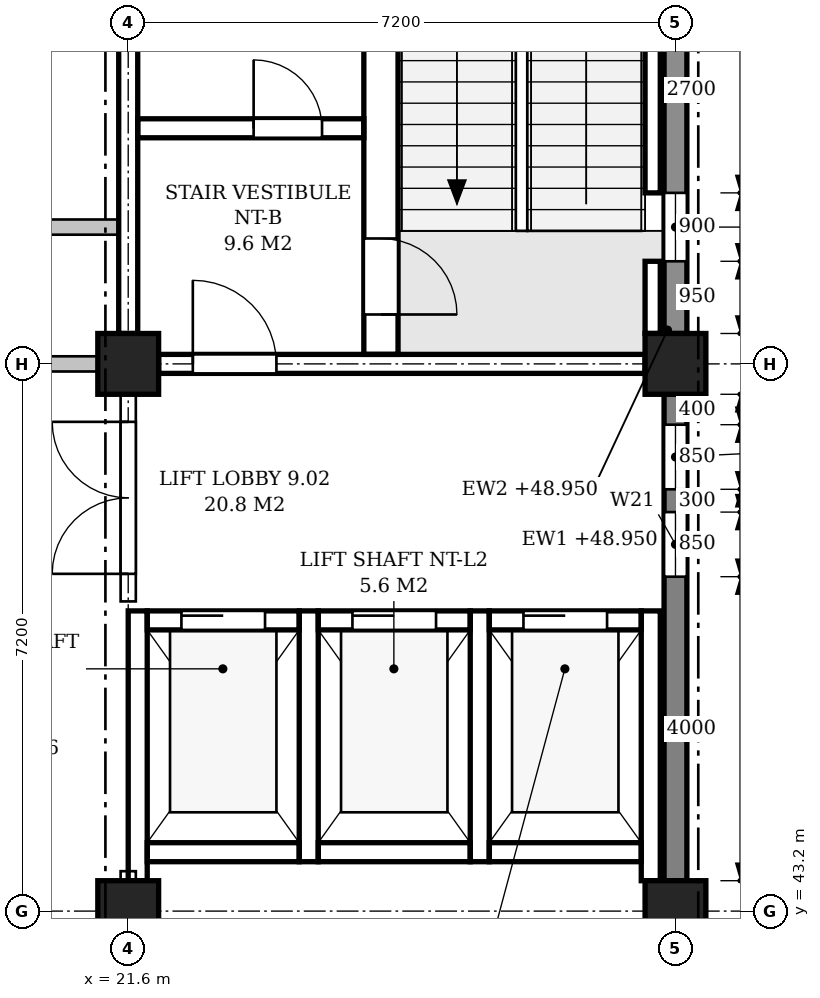
"""IFC4 building model, lengths in metres.
Left out: names, types, materials, properties, quantities, classifications, styles, units other than length and angle.
Written with IfcOpenShell. Run it as: python <this file> out.ifc"""

import sys

from ifc_helpers import new_model, si_unit, direction, frame, frame_2d, origin, origin_2d, place, context, subcontext, project, spatial, polyline, rectangle, outline, extrude, element, fill, save


model = new_model("IFC4")
c1 = context("Model", 3, precision=1e-05, world=origin(), true_north=direction((0.0, 1.0)))
c2 = subcontext(c1, "Body", "Model", "MODEL_VIEW")
j1 = project(units=[si_unit("LENGTHUNIT", "METRE"), si_unit("PLANEANGLEUNIT", "RADIAN")], contexts=[c1])
p1 = place(None, origin())
s1 = spatial("IfcSite", under=j1, at=p1, CompositionType="ELEMENT")
p2 = place(p1, origin())
s2 = spatial("IfcBuilding", under=s1, at=p2, CompositionType="ELEMENT")
p3 = place(p2, frame((0.0, 0.0, 45.3)))
s3 = spatial("IfcBuildingStorey", under=s2, at=p3, CompositionType="ELEMENT", Elevation=45.3)
for number, where, z_axis, x_axis in (
    (1, (21.6, 43.2, 0.0), (0.0, 0.0, 1.0), (1.0, 0.0, 0.0)),
    (2, (21.6, 50.4, 0.0), (0.0, 0.0, 1.0), (1.0, 0.0, 0.0)),
    (3, (28.8, 43.2, 0.0), (0.0, 0.0, 1.0), (1.0, 0.0, 0.0)),
    (4, (28.8, 50.4, 0.0), (0.0, 0.0, 1.0), (1.0, 0.0, 0.0)),
):
    element("IfcColumn", number, at=place(p3, frame(where, z_axis=z_axis, x_axis=x_axis)), inside=s3, PredefinedType="COLUMN", context=c2, shape_type="SweptSolid", body=[
        extrude(rectangle(XDim=0.8, YDim=0.8, at=origin_2d()), origin(), (0.0, 0.0, 1.0), 4.5),
    ])
p4 = place(p3, frame((28.8, 43.6, 0.0), z_axis=(0.0, 0.0, 1.0), x_axis=(0.0, 1.0, 0.0)))
e5 = element("IfcWall", 5, at=p4, inside=s3, PredefinedType="STANDARD", context=c2, shape_type="SweptSolid", body=[
    extrude(rectangle(XDim=6.4, YDim=0.3, at=frame_2d((3.2, 0.0))), origin(), (0.0, 0.0, 1.0), 3.65),
])
p5 = place(p4, frame((4.0, 0.0, 0.9)))
e6 = element("IfcOpeningElement", 6, at=p5, cuts=e5, PredefinedType="OPENING", context=c2, shape_type="SweptSolid", body=[
    extrude(outline(polyline([(0.0, 0.0), (0.85, 0.0), (0.85, 2.25), (0.425, 2.7), (0.0, 2.25), (0.0, 0.0)])), frame((0.0, 0.16, 0.0), z_axis=(0.0, -1.0, 0.0), x_axis=(1.0, 0.0, 0.0)), (0.0, 0.0, 1.0), 0.32),
])
p6 = place(p4, frame((5.15, 0.0, 0.9)))
e7 = element("IfcOpeningElement", 7, at=p6, cuts=e5, PredefinedType="OPENING", context=c2, shape_type="SweptSolid", body=[
    extrude(outline(polyline([(0.0, 0.0), (0.85, 0.0), (0.85, 2.25), (0.425, 2.7), (0.0, 2.25), (0.0, 0.0)])), frame((0.0, 0.16, 0.0), z_axis=(0.0, -1.0, 0.0), x_axis=(1.0, 0.0, 0.0)), (0.0, 0.0, 1.0), 0.32),
])
p7 = place(p3, frame((28.8, 50.8, 0.0), z_axis=(0.0, 0.0, 1.0), x_axis=(0.0, 1.0, 0.0)))
e8 = element("IfcWall", 8, at=p7, inside=s3, PredefinedType="STANDARD", context=c2, shape_type="SweptSolid", body=[
    extrude(rectangle(XDim=6.4, YDim=0.3, at=frame_2d((3.2, 0.0))), origin(), (0.0, 0.0, 1.0), 3.65),
])
p8 = place(p7, frame((0.95, 0.0, 0.9)))
e9 = element("IfcOpeningElement", 9, at=p8, cuts=e8, PredefinedType="OPENING", context=c2, shape_type="SweptSolid", body=[
    extrude(outline(polyline([(0.0, 0.0), (0.9, 0.0), (0.9, 2.25), (0.45, 2.7), (0.0, 2.25), (0.0, 0.0)])), frame((0.0, 0.16, 0.0), z_axis=(0.0, -1.0, 0.0), x_axis=(1.0, 0.0, 0.0)), (0.0, 0.0, 1.0), 0.32),
])
p9 = place(p7, frame((4.55, 0.0, 0.9)))
e10 = element("IfcOpeningElement", 10, at=p9, cuts=e8, PredefinedType="OPENING", context=c2, shape_type="SweptSolid", body=[
    extrude(outline(polyline([(0.0, 0.0), (0.9, 0.0), (0.9, 2.25), (0.45, 2.7), (0.0, 2.25), (0.0, 0.0)])), frame((0.0, 0.16, 0.0), z_axis=(0.0, -1.0, 0.0), x_axis=(1.0, 0.0, 0.0)), (0.0, 0.0, 1.0), 0.32),
])
p10 = place(p3, frame((22.0, 50.4, 0.0), z_axis=(0.0, 0.0, 1.0), x_axis=(1.0, 0.0, 0.0)))
e11 = element("IfcWall", 11, at=p10, inside=s3, PredefinedType="SHEAR", context=c2, shape_type="SweptSolid", body=[
    extrude(rectangle(XDim=6.4, YDim=0.25, at=frame_2d((3.2, 0.0))), origin(), (0.0, 0.0, 1.0), 3.55),
])
p11 = place(p10, frame((0.45, 0.0, 0.0)))
e12 = element("IfcOpeningElement", 12, at=p11, cuts=e11, PredefinedType="OPENING", context=c2, shape_type="SweptSolid", body=[
    extrude(rectangle(XDim=1.1, YDim=2.1, at=frame_2d((0.55, 1.05))), frame((0.0, 0.135, 0.0), z_axis=(0.0, -1.0, 0.0), x_axis=(1.0, 0.0, 0.0)), (0.0, 0.0, 1.0), 0.27),
])
p12 = place(p3, frame((21.6, 50.8, 0.0), z_axis=(0.0, 0.0, 1.0), x_axis=(0.0, 1.0, 0.0)))
e13 = element("IfcWall", 13, at=p12, inside=s3, PredefinedType="SHEAR", context=c2, shape_type="SweptSolid", body=[
    extrude(rectangle(XDim=6.4, YDim=0.25, at=frame_2d((3.2, 0.0))), origin(), (0.0, 0.0, 1.0), 3.55),
])
p13 = place(p3, frame((28.5, 50.8, -0.25), z_axis=(0.0, 0.0, 1.0), x_axis=(0.0, 1.0, 0.0)))
e14 = element("IfcWall", 14, at=p13, inside=s3, PredefinedType="SHEAR", context=c2, shape_type="SweptSolid", body=[
    extrude(rectangle(XDim=0.95, YDim=0.2, at=frame_2d((0.475, 0.0))), origin(), (0.0, 0.0, 1.0), 4.5),
])
p14 = place(p3, frame((28.5, 52.65, -0.25), z_axis=(0.0, 0.0, 1.0), x_axis=(0.0, 1.0, 0.0)))
e15 = element("IfcWall", 15, at=p14, inside=s3, PredefinedType="SHEAR", context=c2, shape_type="SweptSolid", body=[
    extrude(rectangle(XDim=2.7, YDim=0.2, at=frame_2d((1.35, 0.0))), origin(), (0.0, 0.0, 1.0), 4.5),
])
p15 = place(p3, frame((24.925, 50.525, 0.0), z_axis=(0.0, 0.0, 1.0), x_axis=(0.0, 1.0, 0.0)))
e16 = element("IfcWall", 16, at=p15, inside=s3, PredefinedType="SHEAR", context=c2, shape_type="SweptSolid", body=[
    extrude(rectangle(XDim=6.925, YDim=0.45, at=frame_2d((3.462, 0.0))), origin(), (0.0, 0.0, 1.0), 4.25),
])
p16 = place(p15, frame((0.525, 0.0, 0.0)))
e17 = element("IfcOpeningElement", 17, at=p16, cuts=e16, PredefinedType="OPENING", context=c2, shape_type="SweptSolid", body=[
    extrude(rectangle(XDim=1.0, YDim=2.1, at=frame_2d((0.5, 1.05))), frame((0.0, 0.235, 0.0), z_axis=(0.0, -1.0, 0.0), x_axis=(1.0, 0.0, 0.0)), (0.0, 0.0, 1.0), 0.47),
])
p17 = place(p3, frame((21.725, 53.5, 0.0), z_axis=(0.0, 0.0, 1.0), x_axis=(1.0, 0.0, 0.0)))
e18 = element("IfcWall", 18, at=p17, inside=s3, PredefinedType="SHEAR", context=c2, shape_type="SweptSolid", body=[
    extrude(rectangle(XDim=2.975, YDim=0.25, at=frame_2d((1.487, 0.0))), origin(), (0.0, 0.0, 1.0), 4.25),
])
p18 = place(p17, frame((1.525, 0.0, 0.0)))
e19 = element("IfcOpeningElement", 19, at=p18, cuts=e18, PredefinedType="OPENING", context=c2, shape_type="SweptSolid", body=[
    extrude(rectangle(XDim=0.9, YDim=2.1, at=frame_2d((0.45, 1.05))), frame((0.0, 0.135, 0.0), z_axis=(0.0, -1.0, 0.0), x_axis=(1.0, 0.0, 0.0)), (0.0, 0.0, 1.0), 0.27),
])
p19 = place(p3, frame((21.725, 43.6, -0.25), z_axis=(0.0, 0.0, 1.0), x_axis=(0.0, 1.0, 0.0)))
e20 = element("IfcWall", 20, at=p19, inside=s3, PredefinedType="SHEAR", context=c2, shape_type="SweptSolid", body=[
    extrude(rectangle(XDim=3.55, YDim=0.25, at=frame_2d((1.775, 0.0))), origin(), (0.0, 0.0, 1.0), 3.8),
])
for number, where, z_axis, x_axis in (
    (21, (23.975, 43.85, -0.25), (0.0, 0.0, 1.0), (0.0, 1.0, 0.0)),
    (22, (26.225, 43.85, -0.25), (0.0, 0.0, 1.0), (0.0, 1.0, 0.0)),
):
    element("IfcWall", number, at=place(p3, frame(where, z_axis=z_axis, x_axis=x_axis)), inside=s3, PredefinedType="SHEAR", context=c2, shape_type="SweptSolid", body=[
        extrude(rectangle(XDim=3.3, YDim=0.25, at=frame_2d((1.65, 0.0))), origin(), (0.0, 0.0, 1.0), 4.5),
    ])
p20 = place(p3, frame((28.475, 43.6, -0.25), z_axis=(0.0, 0.0, 1.0), x_axis=(0.0, 1.0, 0.0)))
e23 = element("IfcWall", 23, at=p20, inside=s3, PredefinedType="SHEAR", context=c2, shape_type="SweptSolid", body=[
    extrude(rectangle(XDim=3.55, YDim=0.25, at=frame_2d((1.775, 0.0))), origin(), (0.0, 0.0, 1.0), 4.5),
])
p21 = place(p3, frame((21.85, 47.025, -0.25), z_axis=(0.0, 0.0, 1.0), x_axis=(1.0, 0.0, 0.0)))
e24 = element("IfcWall", 24, at=p21, inside=s3, PredefinedType="SHEAR", context=c2, shape_type="SweptSolid", body=[
    extrude(rectangle(XDim=2.0, YDim=0.25, at=frame_2d((1.0, 0.0))), origin(), (0.0, 0.0, 1.0), 4.5),
])
p22 = place(p21, frame((0.45, 0.0, 0.25)))
e25 = element("IfcOpeningElement", 25, at=p22, cuts=e24, PredefinedType="OPENING", context=c2, shape_type="SweptSolid", body=[
    extrude(rectangle(XDim=1.1, YDim=2.1, at=frame_2d((0.55, 1.05))), frame((0.0, 0.135, 0.0), z_axis=(0.0, -1.0, 0.0), x_axis=(1.0, 0.0, 0.0)), (0.0, 0.0, 1.0), 0.27),
])
p23 = place(p3, frame((21.85, 43.975, -0.25), z_axis=(0.0, 0.0, 1.0), x_axis=(1.0, 0.0, 0.0)))
e26 = element("IfcWall", 26, at=p23, inside=s3, PredefinedType="SHEAR", context=c2, shape_type="SweptSolid", body=[
    extrude(rectangle(XDim=2.0, YDim=0.25, at=frame_2d((1.0, 0.0))), origin(), (0.0, 0.0, 1.0), 4.5),
])
p24 = place(p3, frame((24.1, 47.025, -0.25), z_axis=(0.0, 0.0, 1.0), x_axis=(1.0, 0.0, 0.0)))
e27 = element("IfcWall", 27, at=p24, inside=s3, PredefinedType="SHEAR", context=c2, shape_type="SweptSolid", body=[
    extrude(rectangle(XDim=2.0, YDim=0.25, at=frame_2d((1.0, 0.0))), origin(), (0.0, 0.0, 1.0), 4.5),
])
p25 = place(p24, frame((0.45, 0.0, 0.25)))
e28 = element("IfcOpeningElement", 28, at=p25, cuts=e27, PredefinedType="OPENING", context=c2, shape_type="SweptSolid", body=[
    extrude(rectangle(XDim=1.1, YDim=2.1, at=frame_2d((0.55, 1.05))), frame((0.0, 0.135, 0.0), z_axis=(0.0, -1.0, 0.0), x_axis=(1.0, 0.0, 0.0)), (0.0, 0.0, 1.0), 0.27),
])
p26 = place(p3, frame((24.1, 43.975, -0.25), z_axis=(0.0, 0.0, 1.0), x_axis=(1.0, 0.0, 0.0)))
e29 = element("IfcWall", 29, at=p26, inside=s3, PredefinedType="SHEAR", context=c2, shape_type="SweptSolid", body=[
    extrude(rectangle(XDim=2.0, YDim=0.25, at=frame_2d((1.0, 0.0))), origin(), (0.0, 0.0, 1.0), 4.5),
])
p27 = place(p3, frame((26.35, 47.025, -0.25), z_axis=(0.0, 0.0, 1.0), x_axis=(1.0, 0.0, 0.0)))
e30 = element("IfcWall", 30, at=p27, inside=s3, PredefinedType="SHEAR", context=c2, shape_type="SweptSolid", body=[
    extrude(rectangle(XDim=2.0, YDim=0.25, at=frame_2d((1.0, 0.0))), origin(), (0.0, 0.0, 1.0), 4.5),
])
p28 = place(p27, frame((0.45, 0.0, 0.25)))
e31 = element("IfcOpeningElement", 31, at=p28, cuts=e30, PredefinedType="OPENING", context=c2, shape_type="SweptSolid", body=[
    extrude(rectangle(XDim=1.1, YDim=2.1, at=frame_2d((0.55, 1.05))), frame((0.0, 0.135, 0.0), z_axis=(0.0, -1.0, 0.0), x_axis=(1.0, 0.0, 0.0)), (0.0, 0.0, 1.0), 0.27),
])
p29 = place(p3, frame((26.35, 43.975, -0.25), z_axis=(0.0, 0.0, 1.0), x_axis=(1.0, 0.0, 0.0)))
e32 = element("IfcWall", 32, at=p29, inside=s3, PredefinedType="SHEAR", context=c2, shape_type="SweptSolid", body=[
    extrude(rectangle(XDim=2.0, YDim=0.25, at=frame_2d((1.0, 0.0))), origin(), (0.0, 0.0, 1.0), 4.5),
])
p30 = place(p3, frame((14.8, 50.4, 0.0), z_axis=(0.0, 0.0, 1.0), x_axis=(1.0, 0.0, 0.0)))
e33 = element("IfcWall", 33, at=p30, inside=s3, PredefinedType="PARTITIONING", context=c2, shape_type="SweptSolid", body=[
    extrude(rectangle(XDim=6.4, YDim=0.2, at=frame_2d((3.2, 0.0))), origin(), (0.0, 0.0, 1.0), 3.55),
])
p31 = place(p30, frame((4.3, 0.0, 0.0)))
e34 = element("IfcOpeningElement", 34, at=p31, cuts=e33, PredefinedType="OPENING", context=c2, shape_type="SweptSolid", body=[
    extrude(rectangle(XDim=1.0, YDim=2.1, at=frame_2d((0.5, 1.05))), frame((0.0, 0.11, 0.0), z_axis=(0.0, -1.0, 0.0), x_axis=(1.0, 0.0, 0.0)), (0.0, 0.0, 1.0), 0.22),
])
p32 = place(p3, frame((7.325, 52.2, 0.0), z_axis=(0.0, 0.0, 1.0), x_axis=(1.0, 0.0, 0.0)))
e35 = element("IfcWall", 35, at=p32, inside=s3, PredefinedType="PARTITIONING", context=c2, shape_type="SweptSolid", body=[
    extrude(outline(polyline([(0.0, 0.0), (14.15, 0.0), (14.15, 3.55), (14.05, 3.55), (14.05, 4.25), (7.3, 4.25), (7.3, 3.55), (6.85, 3.55), (6.85, 4.25), (0.1, 4.25), (0.1, 3.55), (0.0, 3.55), (0.0, 0.0)])), frame((0.0, 0.1, 0.0), z_axis=(0.0, -1.0, 0.0), x_axis=(1.0, 0.0, 0.0)), (0.0, 0.0, 1.0), 0.2),
])
p33 = place(p32, frame((1.238, 0.0, 0.0)))
e36 = element("IfcOpeningElement", 36, at=p33, cuts=e35, PredefinedType="OPENING", context=c2, shape_type="SweptSolid", body=[
    extrude(rectangle(XDim=1.0, YDim=2.1, at=frame_2d((0.5, 1.05))), frame((0.0, 0.11, 0.0), z_axis=(0.0, -1.0, 0.0), x_axis=(1.0, 0.0, 0.0)), (0.0, 0.0, 1.0), 0.22),
])
p34 = place(p32, frame((4.775, 0.0, 0.0)))
e37 = element("IfcOpeningElement", 37, at=p34, cuts=e35, PredefinedType="OPENING", context=c2, shape_type="SweptSolid", body=[
    extrude(rectangle(XDim=1.0, YDim=2.1, at=frame_2d((0.5, 1.05))), frame((0.0, 0.11, 0.0), z_axis=(0.0, -1.0, 0.0), x_axis=(1.0, 0.0, 0.0)), (0.0, 0.0, 1.0), 0.22),
])
p35 = place(p32, frame((8.375, 0.0, 0.0)))
e38 = element("IfcOpeningElement", 38, at=p35, cuts=e35, PredefinedType="OPENING", context=c2, shape_type="SweptSolid", body=[
    extrude(rectangle(XDim=1.0, YDim=2.1, at=frame_2d((0.5, 1.05))), frame((0.0, 0.11, 0.0), z_axis=(0.0, -1.0, 0.0), x_axis=(1.0, 0.0, 0.0)), (0.0, 0.0, 1.0), 0.22),
])
p36 = place(p32, frame((11.913, 0.0, 0.0)))
e39 = element("IfcOpeningElement", 39, at=p36, cuts=e35, PredefinedType="OPENING", context=c2, shape_type="SweptSolid", body=[
    extrude(rectangle(XDim=1.0, YDim=2.1, at=frame_2d((0.5, 1.05))), frame((0.0, 0.11, 0.0), z_axis=(0.0, -1.0, 0.0), x_axis=(1.0, 0.0, 0.0)), (0.0, 0.0, 1.0), 0.22),
])
p37 = place(p3, frame((21.6, 43.6, 0.0), z_axis=(0.0, 0.0, 1.0), x_axis=(0.0, 1.0, 0.0)))
e40 = element("IfcWall", 40, at=p37, inside=s3, PredefinedType="PARTITIONING", context=c2, shape_type="SweptSolid", body=[
    extrude(rectangle(XDim=0.125, YDim=0.2, at=frame_2d((0.062, 0.0))), origin(), (0.0, 0.0, 1.0), 3.55),
])
p38 = place(p3, frame((21.6, 47.275, 0.0), z_axis=(0.0, 0.0, 1.0), x_axis=(0.0, 1.0, 0.0)))
e41 = element("IfcWall", 41, at=p38, inside=s3, PredefinedType="PARTITIONING", context=c2, shape_type="SweptSolid", body=[
    extrude(rectangle(XDim=2.725, YDim=0.2, at=frame_2d((1.363, 0.0))), origin(), (0.0, 0.0, 1.0), 3.55),
])
p39 = place(p38, frame((0.363, 0.0, 0.0)))
e42 = element("IfcOpeningElement", 42, at=p39, cuts=e41, PredefinedType="OPENING", context=c2, shape_type="SweptSolid", body=[
    extrude(rectangle(XDim=2.0, YDim=2.4, at=frame_2d((1.0, 1.2))), frame((0.0, 0.11, 0.0), z_axis=(0.0, -1.0, 0.0), x_axis=(1.0, 0.0, 0.0)), (0.0, 0.0, 1.0), 0.22),
])
p40 = place(p5, origin())
e43 = element("IfcWindow", 43, at=p40, inside=s3, PartitioningType="SINGLE_PANEL", PredefinedType="WINDOW", context=c2, shape_type="SweptSolid", body=[
    extrude(outline(polyline([(0.0, 0.0), (0.85, 0.0), (0.85, 2.25), (0.425, 2.7), (0.0, 2.25), (0.0, 0.0)])), frame((0.0, 0.03, 0.0), z_axis=(0.0, -1.0, 0.0), x_axis=(1.0, 0.0, 0.0)), (0.0, 0.0, 1.0), 0.06),
])
fill(e6, e43)
p41 = place(p6, origin())
e44 = element("IfcWindow", 44, at=p41, inside=s3, PartitioningType="SINGLE_PANEL", PredefinedType="WINDOW", context=c2, shape_type="SweptSolid", body=[
    extrude(outline(polyline([(0.0, 0.0), (0.85, 0.0), (0.85, 2.25), (0.425, 2.7), (0.0, 2.25), (0.0, 0.0)])), frame((0.0, 0.03, 0.0), z_axis=(0.0, -1.0, 0.0), x_axis=(1.0, 0.0, 0.0)), (0.0, 0.0, 1.0), 0.06),
])
fill(e7, e44)
p42 = place(p8, origin())
e45 = element("IfcWindow", 45, at=p42, inside=s3, PartitioningType="SINGLE_PANEL", PredefinedType="WINDOW", context=c2, shape_type="SweptSolid", body=[
    extrude(outline(polyline([(0.0, 0.0), (0.9, 0.0), (0.9, 2.25), (0.45, 2.7), (0.0, 2.25), (0.0, 0.0)])), frame((0.0, 0.03, 0.0), z_axis=(0.0, -1.0, 0.0), x_axis=(1.0, 0.0, 0.0)), (0.0, 0.0, 1.0), 0.06),
])
fill(e9, e45)
p43 = place(p16, frame((1.0, 0.0, 0.0), z_axis=(0.0, 0.0, 1.0), x_axis=(-1.0, 0.0, 0.0)))
e46 = element("IfcDoor", 46, at=p43, inside=s3, OperationType="SINGLE_SWING_RIGHT", PredefinedType="DOOR", context=c2, shape_type="SweptSolid", body=[
    extrude(rectangle(XDim=1.0, YDim=2.1, at=frame_2d((0.5, 1.05))), frame((0.0, 0.025, 0.0), z_axis=(0.0, -1.0, 0.0), x_axis=(1.0, 0.0, 0.0)), (0.0, 0.0, 1.0), 0.05),
])
fill(e17, e46)
p44 = place(p11, origin())
e47 = element("IfcDoor", 47, at=p44, inside=s3, OperationType="SINGLE_SWING_LEFT", PredefinedType="DOOR", context=c2, shape_type="SweptSolid", body=[
    extrude(rectangle(XDim=1.1, YDim=2.1, at=frame_2d((0.55, 1.05))), frame((0.0, 0.025, 0.0), z_axis=(0.0, -1.0, 0.0), x_axis=(1.0, 0.0, 0.0)), (0.0, 0.0, 1.0), 0.05),
])
fill(e12, e47)
p45 = place(p18, origin())
e48 = element("IfcDoor", 48, at=p45, inside=s3, OperationType="SINGLE_SWING_LEFT", PredefinedType="DOOR", context=c2, shape_type="SweptSolid", body=[
    extrude(rectangle(XDim=0.9, YDim=2.1, at=frame_2d((0.45, 1.05))), frame((0.0, 0.025, 0.0), z_axis=(0.0, -1.0, 0.0), x_axis=(1.0, 0.0, 0.0)), (0.0, 0.0, 1.0), 0.05),
])
fill(e19, e48)
p46 = place(p22, origin())
e49 = element("IfcDoor", 49, at=p46, inside=s3, OperationType="SLIDING_TO_LEFT", PredefinedType="DOOR", context=c2, shape_type="SweptSolid", body=[
    extrude(rectangle(XDim=1.1, YDim=2.1, at=frame_2d((0.55, 1.05))), frame((0.0, 0.025, 0.0), z_axis=(0.0, -1.0, 0.0), x_axis=(1.0, 0.0, 0.0)), (0.0, 0.0, 1.0), 0.05),
])
fill(e25, e49)
p47 = place(p25, origin())
e50 = element("IfcDoor", 50, at=p47, inside=s3, OperationType="SLIDING_TO_LEFT", PredefinedType="DOOR", context=c2, shape_type="SweptSolid", body=[
    extrude(rectangle(XDim=1.1, YDim=2.1, at=frame_2d((0.55, 1.05))), frame((0.0, 0.025, 0.0), z_axis=(0.0, -1.0, 0.0), x_axis=(1.0, 0.0, 0.0)), (0.0, 0.0, 1.0), 0.05),
])
fill(e28, e50)
p48 = place(p28, origin())
e51 = element("IfcDoor", 51, at=p48, inside=s3, OperationType="SLIDING_TO_LEFT", PredefinedType="DOOR", context=c2, shape_type="SweptSolid", body=[
    extrude(rectangle(XDim=1.1, YDim=2.1, at=frame_2d((0.55, 1.05))), frame((0.0, 0.025, 0.0), z_axis=(0.0, -1.0, 0.0), x_axis=(1.0, 0.0, 0.0)), (0.0, 0.0, 1.0), 0.05),
])
fill(e31, e51)
p49 = place(p39, origin())
e52 = element("IfcDoor", 52, at=p49, inside=s3, OperationType="DOUBLE_DOOR_SINGLE_SWING", PredefinedType="DOOR", context=c2, shape_type="SweptSolid", body=[
    extrude(rectangle(XDim=2.0, YDim=2.4, at=frame_2d((1.0, 1.2))), frame((0.0, 0.025, 0.0), z_axis=(0.0, -1.0, 0.0), x_axis=(1.0, 0.0, 0.0)), (0.0, 0.0, 1.0), 0.05),
])
fill(e42, e52)
save(model, sys.argv[1])
